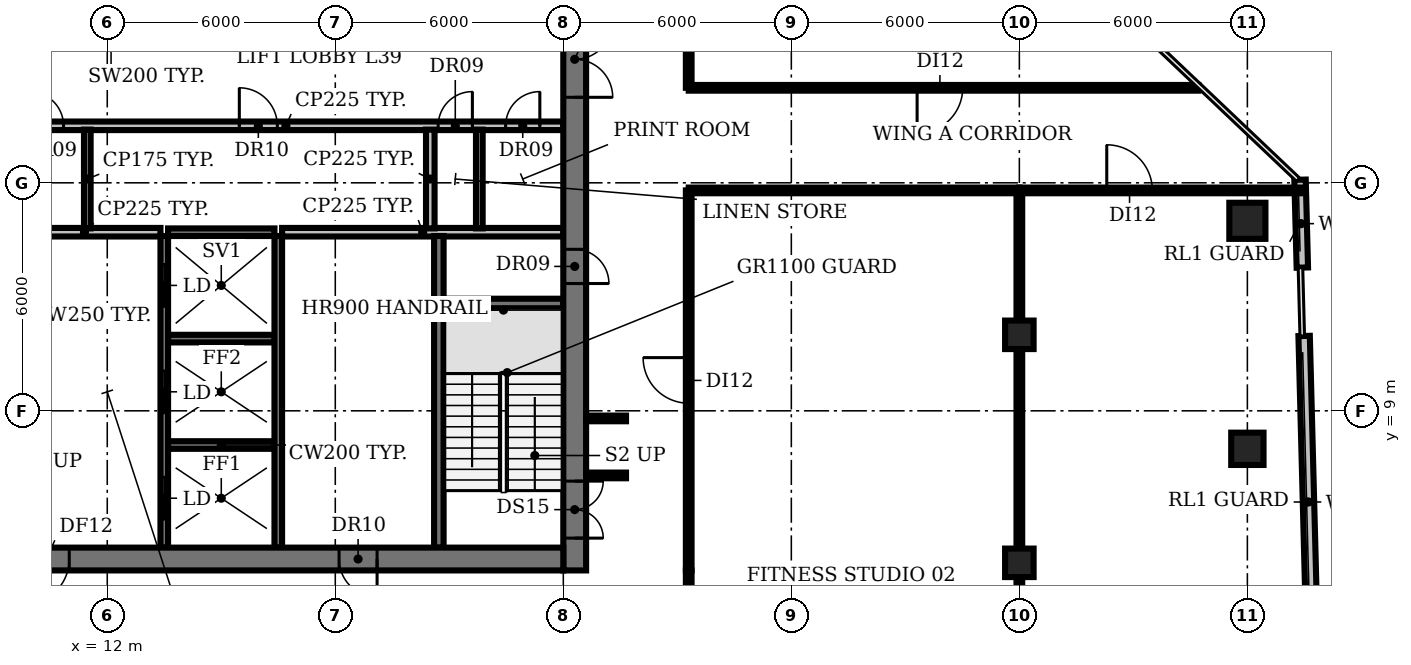
"""IFC4 building model, lengths in metres.
Left out: names, types, materials, properties, quantities, classifications, styles, units other than length and angle.
Written with IfcOpenShell. Run it as: python <this file> out.ifc"""

import sys

from ifc_helpers import new_model, si_unit, direction, frame, frame_2d, origin, origin_2d, place, context, subcontext, project, spatial, rectangle, circle, extrude, element, fill, save


model = new_model("IFC4")
c1 = context("Model", 3, precision=1e-05, world=origin(), true_north=direction((0.0, 1.0)))
c2 = subcontext(c1, "Body", "Model", "MODEL_VIEW")
j1 = project(units=[si_unit("LENGTHUNIT", "METRE"), si_unit("PLANEANGLEUNIT", "RADIAN")], contexts=[c1])
p1 = place(None, origin())
s1 = spatial("IfcSite", under=j1, at=p1, CompositionType="ELEMENT")
p2 = place(p1, origin())
s2 = spatial("IfcBuilding", under=s1, at=p2, CompositionType="ELEMENT")
p3 = place(p2, frame((0.0, 0.0, 176.0)))
s3 = spatial("IfcBuildingStorey", under=s2, at=p3, CompositionType="ELEMENT", Elevation=176.0)
for number, where, z_axis, x_axis in (
    (1, (36.0, 5.0, 0.0), (0.0, 0.0, 1.0), (1.0, 0.0, 0.0)),
    (2, (36.0, 11.0, 0.0), (0.0, 0.0, 1.0), (1.0, 0.0, 0.0)),
):
    element("IfcColumn", number, at=place(p3, frame(where, z_axis=z_axis, x_axis=x_axis)), inside=s3, PredefinedType="COLUMN", context=c2, shape_type="SweptSolid", body=[
        extrude(rectangle(XDim=0.75, YDim=0.75, at=origin_2d()), origin(), (0.0, 0.0, 1.0), 3.85),
    ])
p4 = place(p3, frame((42.0, 8.0, 0.0), z_axis=(0.0, 0.0, 1.0), x_axis=(1.0, 0.0, 0.0)))
e3 = element("IfcColumn", 3, at=p4, inside=s3, PredefinedType="COLUMN", context=c2, shape_type="SweptSolid", body=[
    extrude(rectangle(XDim=0.85, YDim=0.85, at=origin_2d()), origin(), (0.0, 0.0, 1.0), 3.85),
])
p5 = place(p3, frame((42.0, 14.0, 0.0), z_axis=(0.0, 0.0, 1.0), x_axis=(1.0, 0.0, 0.0)))
e4 = element("IfcColumn", 4, at=p5, inside=s3, PredefinedType="COLUMN", context=c2, shape_type="SweptSolid", body=[
    extrude(circle(Radius=0.475, at=origin_2d()), origin(), (0.0, 0.0, 1.0), 3.85),
])
p6 = place(p3, frame((43.722, 2.233, 0.0), z_axis=(0.0, 0.0, 1.0), x_axis=(-0.026202368137, 0.99965665901, 0.0)))
e5 = element("IfcWall", 5, at=p6, inside=s3, PredefinedType="SOLIDWALL", context=c2, shape_type="SweptSolid", body=[
    extrude(rectangle(XDim=8.74, YDim=0.3, at=frame_2d((4.37, 0.0))), origin(), (0.0, 0.0, 1.0), 3.85),
])
p7 = place(p3, frame((43.446, 12.769, 0.0), z_axis=(0.0, 0.0, 1.0), x_axis=(-0.026065246512, 0.999660243745, 0.0)))
e6 = element("IfcWall", 6, at=p7, inside=s3, PredefinedType="SOLIDWALL", context=c2, shape_type="SweptSolid", body=[
    extrude(rectangle(XDim=2.313, YDim=0.3, at=frame_2d((1.157, 0.0))), origin(), (0.0, 0.0, 1.0), 3.85),
])
for number, where, z_axis, x_axis in (
    (7, (13.6, 8.1, 0.0), (0.0, 0.0, 1.0), (1.0, 0.0, 0.0)),
    (8, (13.6, 10.9, 0.0), (0.0, 0.0, 1.0), (1.0, 0.0, 0.0)),
):
    element("IfcWall", number, at=place(p3, frame(where, z_axis=z_axis, x_axis=x_axis)), inside=s3, PredefinedType="SHEAR", context=c2, shape_type="SweptSolid", body=[
        extrude(rectangle(XDim=2.8, YDim=0.2, at=frame_2d((1.4, 0.0))), origin(), (0.0, 0.0, 1.0), 3.85),
    ])
p8 = place(p3, frame((20.85, 11.825, 0.0), z_axis=(0.0, 0.0, 1.0), x_axis=(1.0, 0.0, 0.0)))
e9 = element("IfcWall", 9, at=p8, inside=s3, PredefinedType="SHEAR", context=c2, shape_type="SweptSolid", body=[
    extrude(rectangle(XDim=3.15, YDim=0.25, at=frame_2d((1.575, 0.0))), origin(), (0.0, 0.0, 1.0), 3.85),
])
p9 = place(p3, frame((9.4, 13.7, 0.0), z_axis=(0.0, 0.0, 1.0), x_axis=(1.0, 0.0, 0.0)))
e10 = element("IfcWall", 10, at=p9, inside=s3, PredefinedType="PARTITIONING", context=c2, shape_type="SweptSolid", body=[
    extrude(rectangle(XDim=4.0, YDim=0.225, at=frame_2d((2.0, 0.0))), origin(), (0.0, 0.0, 1.0), 3.85),
])
p10 = place(p3, frame((13.6, 13.7, 0.0), z_axis=(0.0, 0.0, 1.0), x_axis=(1.0, 0.0, 0.0)))
e11 = element("IfcWall", 11, at=p10, inside=s3, PredefinedType="SHEAR", context=c2, shape_type="SweptSolid", body=[
    extrude(rectangle(XDim=2.8, YDim=0.2, at=frame_2d((1.4, 0.0))), origin(), (0.0, 0.0, 1.0), 3.85),
])
p11 = place(p3, frame((16.6, 13.7, 0.0), z_axis=(0.0, 0.0, 1.0), x_axis=(1.0, 0.0, 0.0)))
e12 = element("IfcWall", 12, at=p11, inside=s3, PredefinedType="PARTITIONING", context=c2, shape_type="SweptSolid", body=[
    extrude(rectangle(XDim=7.4, YDim=0.225, at=frame_2d((3.7, 0.0))), origin(), (0.0, 0.0, 1.0), 3.85),
])
p12 = place(p3, frame((9.4, 16.5, 0.0), z_axis=(0.0, 0.0, 1.0), x_axis=(1.0, 0.0, 0.0)))
e13 = element("IfcWall", 13, at=p12, inside=s3, PredefinedType="PARTITIONING", context=c2, shape_type="SweptSolid", body=[
    extrude(rectangle(XDim=14.6, YDim=0.225, at=frame_2d((7.3, 0.0))), origin(), (0.0, 0.0, 1.0), 3.85),
])
p13 = place(p12, frame((0.55, 0.0, 0.0)))
e14 = element("IfcOpeningElement", 14, at=p13, cuts=e13, PredefinedType="OPENING", context=c2, shape_type="SweptSolid", body=[
    extrude(rectangle(XDim=0.9, YDim=2.1, at=frame_2d((0.45, 1.05))), frame((0.0, 0.123, 0.0), z_axis=(0.0, -1.0, 0.0), x_axis=(1.0, 0.0, 0.0)), (0.0, 0.0, 1.0), 0.245),
])
p14 = place(p12, frame((6.075, 0.0, 0.0)))
e15 = element("IfcOpeningElement", 15, at=p14, cuts=e13, PredefinedType="OPENING", context=c2, shape_type="SweptSolid", body=[
    extrude(rectangle(XDim=1.0, YDim=2.1, at=frame_2d((0.5, 1.05))), frame((0.0, 0.123, 0.0), z_axis=(0.0, -1.0, 0.0), x_axis=(1.0, 0.0, 0.0)), (0.0, 0.0, 1.0), 0.245),
])
p15 = place(p12, frame((11.308, 0.0, 0.0)))
e16 = element("IfcOpeningElement", 16, at=p15, cuts=e13, PredefinedType="OPENING", context=c2, shape_type="SweptSolid", body=[
    extrude(rectangle(XDim=0.9, YDim=2.1, at=frame_2d((0.45, 1.05))), frame((0.0, 0.123, 0.0), z_axis=(0.0, -1.0, 0.0), x_axis=(1.0, 0.0, 0.0)), (0.0, 0.0, 1.0), 0.245),
])
p16 = place(p12, frame((13.083, 0.0, 0.0)))
e17 = element("IfcOpeningElement", 17, at=p16, cuts=e13, PredefinedType="OPENING", context=c2, shape_type="SweptSolid", body=[
    extrude(rectangle(XDim=0.9, YDim=2.1, at=frame_2d((0.45, 1.05))), frame((0.0, 0.123, 0.0), z_axis=(0.0, -1.0, 0.0), x_axis=(1.0, 0.0, 0.0)), (0.0, 0.0, 1.0), 0.245),
])
p17 = place(p3, frame((11.475, 13.8, 0.0), z_axis=(0.0, 0.0, 1.0), x_axis=(0.0, 1.0, 0.0)))
e18 = element("IfcWall", 18, at=p17, inside=s3, PredefinedType="PARTITIONING", context=c2, shape_type="SweptSolid", body=[
    extrude(rectangle(XDim=2.6, YDim=0.175, at=frame_2d((1.3, 0.0))), origin(), (0.0, 0.0, 1.0), 3.85),
])
p18 = place(p3, frame((13.5, 5.4, 0.0), z_axis=(0.0, 0.0, 1.0), x_axis=(0.0, 1.0, 0.0)))
e19 = element("IfcWall", 19, at=p18, inside=s3, PredefinedType="SHEAR", context=c2, shape_type="SweptSolid", body=[
    extrude(rectangle(XDim=8.2, YDim=0.2, at=frame_2d((4.1, 0.0))), origin(), (0.0, 0.0, 1.0), 3.85),
])
p19 = place(p18, frame((0.75, 0.0, 0.0)))
e20 = element("IfcOpeningElement", 20, at=p19, cuts=e19, PredefinedType="OPENING", context=c2, shape_type="SweptSolid", body=[
    extrude(rectangle(XDim=1.1, YDim=2.1, at=frame_2d((0.55, 1.05))), frame((0.0, 0.11, 0.0), z_axis=(0.0, -1.0, 0.0), x_axis=(1.0, 0.0, 0.0)), (0.0, 0.0, 1.0), 0.22),
])
p20 = place(p18, frame((3.55, 0.0, 0.0)))
e21 = element("IfcOpeningElement", 21, at=p20, cuts=e19, PredefinedType="OPENING", context=c2, shape_type="SweptSolid", body=[
    extrude(rectangle(XDim=1.1, YDim=2.1, at=frame_2d((0.55, 1.05))), frame((0.0, 0.11, 0.0), z_axis=(0.0, -1.0, 0.0), x_axis=(1.0, 0.0, 0.0)), (0.0, 0.0, 1.0), 0.22),
])
p21 = place(p18, frame((6.35, 0.0, 0.0)))
e22 = element("IfcOpeningElement", 22, at=p21, cuts=e19, PredefinedType="OPENING", context=c2, shape_type="SweptSolid", body=[
    extrude(rectangle(XDim=1.1, YDim=2.1, at=frame_2d((0.55, 1.05))), frame((0.0, 0.11, 0.0), z_axis=(0.0, -1.0, 0.0), x_axis=(1.0, 0.0, 0.0)), (0.0, 0.0, 1.0), 0.22),
])
p22 = place(p3, frame((16.5, 5.4, 0.0), z_axis=(0.0, 0.0, 1.0), x_axis=(0.0, 1.0, 0.0)))
e23 = element("IfcWall", 23, at=p22, inside=s3, PredefinedType="SHEAR", context=c2, shape_type="SweptSolid", body=[
    extrude(rectangle(XDim=8.2, YDim=0.2, at=frame_2d((4.1, 0.0))), origin(), (0.0, 0.0, 1.0), 3.85),
])
p23 = place(p3, frame((20.5, 13.8, 0.0), z_axis=(0.0, 0.0, 1.0), x_axis=(0.0, 1.0, 0.0)))
e24 = element("IfcWall", 24, at=p23, inside=s3, PredefinedType="PARTITIONING", context=c2, shape_type="SweptSolid", body=[
    extrude(rectangle(XDim=2.6, YDim=0.225, at=frame_2d((1.3, 0.0))), origin(), (0.0, 0.0, 1.0), 3.85),
])
p24 = place(p3, frame((20.725, 5.4, 0.0), z_axis=(0.0, 0.0, 1.0), x_axis=(0.0, 1.0, 0.0)))
e25 = element("IfcWall", 25, at=p24, inside=s3, PredefinedType="SHEAR", context=c2, shape_type="SweptSolid", body=[
    extrude(rectangle(XDim=8.2, YDim=0.25, at=frame_2d((4.1, 0.0))), origin(), (0.0, 0.0, 1.0), 3.85),
])
p25 = place(p3, frame((21.79, 13.8, 0.0), z_axis=(0.0, 0.0, 1.0), x_axis=(0.0, 1.0, 0.0)))
e26 = element("IfcWall", 26, at=p25, inside=s3, PredefinedType="PARTITIONING", context=c2, shape_type="SweptSolid", body=[
    extrude(rectangle(XDim=2.6, YDim=0.175, at=frame_2d((1.3, 0.0))), origin(), (0.0, 0.0, 1.0), 3.85),
])
p26 = place(p3, frame((24.3, 25.555, 0.0), z_axis=(0.0, 0.0, 1.0), x_axis=(0.0, -1.0, 0.0)))
e27 = element("IfcWall", 27, at=p26, inside=s3, PredefinedType="SHEAR", context=c2, shape_type="SweptSolid", body=[
    extrude(rectangle(XDim=20.755, YDim=0.6, at=frame_2d((10.377, 0.0))), origin(), (0.0, 0.0, 1.0), 3.85),
])
p27 = place(p26, frame((18.405, 0.0, 0.0)))
e28 = element("IfcOpeningElement", 28, at=p27, cuts=e27, PredefinedType="OPENING", context=c2, shape_type="SweptSolid", body=[
    extrude(rectangle(XDim=1.5, YDim=2.1, at=frame_2d((0.75, 1.05))), frame((0.0, 0.31, 0.0), z_axis=(0.0, -1.0, 0.0), x_axis=(1.0, 0.0, 0.0)), (0.0, 0.0, 1.0), 0.62),
])
p28 = place(p26, frame((12.305, 0.0, 0.0)))
e29 = element("IfcOpeningElement", 29, at=p28, cuts=e27, PredefinedType="OPENING", context=c2, shape_type="SweptSolid", body=[
    extrude(rectangle(XDim=0.9, YDim=2.1, at=frame_2d((0.45, 1.05))), frame((0.0, 0.31, 0.0), z_axis=(0.0, -1.0, 0.0), x_axis=(1.0, 0.0, 0.0)), (0.0, 0.0, 1.0), 0.62),
])
p29 = place(p26, frame((6.305, 0.0, 0.0)))
e30 = element("IfcOpeningElement", 30, at=p29, cuts=e27, PredefinedType="OPENING", context=c2, shape_type="SweptSolid", body=[
    extrude(rectangle(XDim=2.0, YDim=2.1, at=frame_2d((1.0, 1.05))), frame((0.0, 0.31, 0.0), z_axis=(0.0, -1.0, 0.0), x_axis=(1.0, 0.0, 0.0)), (0.0, 0.0, 1.0), 0.62),
])
p30 = place(p3, frame((24.0, 5.1, 0.0), z_axis=(0.0, 0.0, 1.0), x_axis=(-1.0, 0.0, 0.0)))
e31 = element("IfcWall", 31, at=p30, inside=s3, PredefinedType="SHEAR", context=c2, shape_type="SweptSolid", body=[
    extrude(rectangle(XDim=18.0, YDim=0.6, at=frame_2d((9.0, 0.0))), origin(), (0.0, 0.0, 1.0), 3.85),
])
p31 = place(p30, frame((13.0, 0.0, 0.0)))
e32 = element("IfcOpeningElement", 32, at=p31, cuts=e31, PredefinedType="OPENING", context=c2, shape_type="SweptSolid", body=[
    extrude(rectangle(XDim=1.2, YDim=2.1, at=frame_2d((0.6, 1.05))), frame((0.0, 0.31, 0.0), z_axis=(0.0, -1.0, 0.0), x_axis=(1.0, 0.0, 0.0)), (0.0, 0.0, 1.0), 0.62),
])
p32 = place(p30, frame((4.9, 0.0, 0.0)))
e33 = element("IfcOpeningElement", 33, at=p32, cuts=e31, PredefinedType="OPENING", context=c2, shape_type="SweptSolid", body=[
    extrude(rectangle(XDim=1.0, YDim=2.1, at=frame_2d((0.5, 1.05))), frame((0.0, 0.31, 0.0), z_axis=(0.0, -1.0, 0.0), x_axis=(1.0, 0.0, 0.0)), (0.0, 0.0, 1.0), 0.62),
])
for number, where, z_axis, x_axis in (
    (34, (24.6, 7.3, 0.0), (0.0, 0.0, 1.0), (1.0, 0.0, 0.0)),
    (35, (24.6, 8.8, 0.0), (0.0, 0.0, 1.0), (1.0, 0.0, 0.0)),
):
    element("IfcWall", number, at=place(p3, frame(where, z_axis=z_axis, x_axis=x_axis)), inside=s3, PredefinedType="PARTITIONING", context=c2, shape_type="SweptSolid", body=[
        extrude(rectangle(XDim=1.05, YDim=0.15, at=frame_2d((0.525, 0.0))), origin(), (0.0, 0.0, 1.0), 2.88),
    ])
p33 = place(p3, frame((27.3, 0.9, 0.0), z_axis=(0.0, 0.0, 1.0), x_axis=(0.0, 1.0, 0.0)))
e36 = element("IfcWall", 36, at=p33, inside=s3, PredefinedType="PARTITIONING", context=c2, shape_type="SweptSolid", body=[
    extrude(rectangle(XDim=3.9, YDim=0.15, at=frame_2d((1.95, 0.0))), origin(), (0.0, 0.0, 1.0), 2.88),
])
p34 = place(p3, frame((27.3, 4.8, 0.0), z_axis=(0.0, 0.0, 1.0), x_axis=(0.0, 1.0, 0.0)))
e37 = element("IfcWall", 37, at=p34, inside=s3, PredefinedType="PARTITIONING", context=c2, shape_type="SweptSolid", body=[
    extrude(rectangle(XDim=10.0, YDim=0.15, at=frame_2d((5.0, 0.0))), origin(), (0.0, 0.0, 1.0), 2.88),
])
p35 = place(p34, frame((4.4, 0.0, 0.0)))
e38 = element("IfcOpeningElement", 38, at=p35, cuts=e37, PredefinedType="OPENING", context=c2, shape_type="SweptSolid", body=[
    extrude(rectangle(XDim=1.2, YDim=2.1, at=frame_2d((0.6, 1.05))), frame((0.0, 0.085, 0.0), z_axis=(0.0, -1.0, 0.0), x_axis=(1.0, 0.0, 0.0)), (0.0, 0.0, 1.0), 0.17),
])
p36 = place(p3, frame((27.3, 14.8, 0.0), z_axis=(0.0, 0.0, 1.0), x_axis=(1.0, 0.0, 0.0)))
e39 = element("IfcWall", 39, at=p36, inside=s3, PredefinedType="PARTITIONING", context=c2, shape_type="SweptSolid", body=[
    extrude(rectangle(XDim=8.7, YDim=0.15, at=frame_2d((4.35, 0.0))), origin(), (0.0, 0.0, 1.0), 2.88),
])
p37 = place(p3, frame((27.3, 17.5, 0.0), z_axis=(0.0, 0.0, 1.0), x_axis=(0.0, 1.0, 0.0)))
e40 = element("IfcWall", 40, at=p37, inside=s3, PredefinedType="PARTITIONING", context=c2, shape_type="SweptSolid", body=[
    extrude(rectangle(XDim=6.88, YDim=0.15, at=frame_2d((3.44, 0.0))), origin(), (0.0, 0.0, 1.0), 2.88),
])
p38 = place(p3, frame((36.0, -4.98, 0.0), z_axis=(0.0, 0.0, 1.0), x_axis=(0.0, 1.0, 0.0)))
e41 = element("IfcWall", 41, at=p38, inside=s3, PredefinedType="PARTITIONING", context=c2, shape_type="SweptSolid", body=[
    extrude(rectangle(XDim=19.78, YDim=0.15, at=frame_2d((9.89, 0.0))), origin(), (0.0, 0.0, 1.0), 2.88),
])
p39 = place(p3, frame((36.0, 14.8, 0.0), z_axis=(0.0, 0.0, 1.0), x_axis=(1.0, 0.0, 0.0)))
e42 = element("IfcWall", 42, at=p39, inside=s3, PredefinedType="PARTITIONING", context=c2, shape_type="SweptSolid", body=[
    extrude(rectangle(XDim=7.404, YDim=0.15, at=frame_2d((3.702, 0.0))), origin(), (0.0, 0.0, 1.0), 2.88),
])
p40 = place(p39, frame((2.3, 0.0, 0.0)))
e43 = element("IfcOpeningElement", 43, at=p40, cuts=e42, PredefinedType="OPENING", context=c2, shape_type="SweptSolid", body=[
    extrude(rectangle(XDim=1.2, YDim=2.1, at=frame_2d((0.6, 1.05))), frame((0.0, 0.085, 0.0), z_axis=(0.0, -1.0, 0.0), x_axis=(1.0, 0.0, 0.0)), (0.0, 0.0, 1.0), 0.17),
])
p41 = place(p3, frame((40.71, 17.5, 0.0), z_axis=(0.0, 0.0, 1.0), x_axis=(-1.0, 0.0, 0.0)))
e44 = element("IfcWall", 44, at=p41, inside=s3, PredefinedType="PARTITIONING", context=c2, shape_type="SweptSolid", body=[
    extrude(rectangle(XDim=13.41, YDim=0.15, at=frame_2d((6.705, 0.0))), origin(), (0.0, 0.0, 1.0), 2.88),
])
p42 = place(p41, frame((6.2, 0.0, 0.0)))
e45 = element("IfcOpeningElement", 45, at=p42, cuts=e44, PredefinedType="OPENING", context=c2, shape_type="SweptSolid", body=[
    extrude(rectangle(XDim=1.2, YDim=2.1, at=frame_2d((0.6, 1.05))), frame((0.0, 0.085, 0.0), z_axis=(0.0, -1.0, 0.0), x_axis=(1.0, 0.0, 0.0)), (0.0, 0.0, 1.0), 0.17),
])
p43 = place(p13, origin())
e46 = element("IfcDoor", 46, at=p43, inside=s3, OperationType="SINGLE_SWING_LEFT", PredefinedType="DOOR", context=c2, shape_type="SweptSolid", body=[
    extrude(rectangle(XDim=0.9, YDim=2.1, at=frame_2d((0.45, 1.05))), frame((0.0, 0.025, 0.0), z_axis=(0.0, -1.0, 0.0), x_axis=(1.0, 0.0, 0.0)), (0.0, 0.0, 1.0), 0.05),
])
fill(e14, e46)
p44 = place(p14, origin())
e47 = element("IfcDoor", 47, at=p44, inside=s3, OperationType="SINGLE_SWING_LEFT", PredefinedType="DOOR", context=c2, shape_type="SweptSolid", body=[
    extrude(rectangle(XDim=1.0, YDim=2.1, at=frame_2d((0.5, 1.05))), frame((0.0, 0.025, 0.0), z_axis=(0.0, -1.0, 0.0), x_axis=(1.0, 0.0, 0.0)), (0.0, 0.0, 1.0), 0.05),
])
fill(e15, e47)
p45 = place(p15, origin())
e48 = element("IfcDoor", 48, at=p45, inside=s3, OperationType="SINGLE_SWING_RIGHT", PredefinedType="DOOR", context=c2, shape_type="SweptSolid", body=[
    extrude(rectangle(XDim=0.9, YDim=2.1, at=frame_2d((0.45, 1.05))), frame((0.0, 0.025, 0.0), z_axis=(0.0, -1.0, 0.0), x_axis=(1.0, 0.0, 0.0)), (0.0, 0.0, 1.0), 0.05),
])
fill(e16, e48)
p46 = place(p16, origin())
e49 = element("IfcDoor", 49, at=p46, inside=s3, OperationType="SINGLE_SWING_RIGHT", PredefinedType="DOOR", context=c2, shape_type="SweptSolid", body=[
    extrude(rectangle(XDim=0.9, YDim=2.1, at=frame_2d((0.45, 1.05))), frame((0.0, 0.025, 0.0), z_axis=(0.0, -1.0, 0.0), x_axis=(1.0, 0.0, 0.0)), (0.0, 0.0, 1.0), 0.05),
])
fill(e17, e49)
p47 = place(p19, origin())
e50 = element("IfcDoor", 50, at=p47, inside=s3, OperationType="DOUBLE_DOOR_SLIDING", PredefinedType="DOOR", context=c2, shape_type="SweptSolid", body=[
    extrude(rectangle(XDim=1.1, YDim=2.1, at=frame_2d((0.55, 1.05))), frame((0.0, 0.025, 0.0), z_axis=(0.0, -1.0, 0.0), x_axis=(1.0, 0.0, 0.0)), (0.0, 0.0, 1.0), 0.05),
])
fill(e20, e50)
p48 = place(p20, origin())
e51 = element("IfcDoor", 51, at=p48, inside=s3, OperationType="DOUBLE_DOOR_SLIDING", PredefinedType="DOOR", context=c2, shape_type="SweptSolid", body=[
    extrude(rectangle(XDim=1.1, YDim=2.1, at=frame_2d((0.55, 1.05))), frame((0.0, 0.025, 0.0), z_axis=(0.0, -1.0, 0.0), x_axis=(1.0, 0.0, 0.0)), (0.0, 0.0, 1.0), 0.05),
])
fill(e21, e51)
p49 = place(p21, origin())
e52 = element("IfcDoor", 52, at=p49, inside=s3, OperationType="DOUBLE_DOOR_SLIDING", PredefinedType="DOOR", context=c2, shape_type="SweptSolid", body=[
    extrude(rectangle(XDim=1.1, YDim=2.1, at=frame_2d((0.55, 1.05))), frame((0.0, 0.025, 0.0), z_axis=(0.0, -1.0, 0.0), x_axis=(1.0, 0.0, 0.0)), (0.0, 0.0, 1.0), 0.05),
])
fill(e22, e52)
p50 = place(p27, origin())
e53 = element("IfcDoor", 53, at=p50, inside=s3, OperationType="DOUBLE_DOOR_SINGLE_SWING", PredefinedType="DOOR", context=c2, shape_type="SweptSolid", body=[
    extrude(rectangle(XDim=1.5, YDim=2.1, at=frame_2d((0.75, 1.05))), frame((0.0, 0.025, 0.0), z_axis=(0.0, -1.0, 0.0), x_axis=(1.0, 0.0, 0.0)), (0.0, 0.0, 1.0), 0.05),
])
fill(e28, e53)
p51 = place(p28, origin())
e54 = element("IfcDoor", 54, at=p51, inside=s3, OperationType="SINGLE_SWING_RIGHT", PredefinedType="DOOR", context=c2, shape_type="SweptSolid", body=[
    extrude(rectangle(XDim=0.9, YDim=2.1, at=frame_2d((0.45, 1.05))), frame((0.0, -0.24, 0.0), z_axis=(0.0, -1.0, 0.0), x_axis=(1.0, 0.0, 0.0)), (0.0, 0.0, 1.0), 0.05),
])
fill(e29, e54)
p52 = place(p29, origin())
e55 = element("IfcDoor", 55, at=p52, inside=s3, OperationType="DOUBLE_DOOR_SINGLE_SWING", PredefinedType="DOOR", context=c2, shape_type="SweptSolid", body=[
    extrude(rectangle(XDim=2.0, YDim=2.1, at=frame_2d((1.0, 1.05))), frame((0.0, 0.025, 0.0), z_axis=(0.0, -1.0, 0.0), x_axis=(1.0, 0.0, 0.0)), (0.0, 0.0, 1.0), 0.05),
])
fill(e30, e55)
p53 = place(p31, origin())
e56 = element("IfcDoor", 56, at=p53, inside=s3, OperationType="SINGLE_SWING_RIGHT", PredefinedType="DOOR", context=c2, shape_type="SweptSolid", body=[
    extrude(rectangle(XDim=1.2, YDim=2.1, at=frame_2d((0.6, 1.05))), frame((0.0, 0.025, 0.0), z_axis=(0.0, -1.0, 0.0), x_axis=(1.0, 0.0, 0.0)), (0.0, 0.0, 1.0), 0.05),
])
fill(e32, e56)
p54 = place(p32, origin())
e57 = element("IfcDoor", 57, at=p54, inside=s3, OperationType="SINGLE_SWING_LEFT", PredefinedType="DOOR", context=c2, shape_type="SweptSolid", body=[
    extrude(rectangle(XDim=1.0, YDim=2.1, at=frame_2d((0.5, 1.05))), frame((0.0, -0.24, 0.0), z_axis=(0.0, -1.0, 0.0), x_axis=(1.0, 0.0, 0.0)), (0.0, 0.0, 1.0), 0.05),
])
fill(e33, e57)
p55 = place(p35, origin())
e58 = element("IfcDoor", 58, at=p55, inside=s3, OperationType="SINGLE_SWING_RIGHT", PredefinedType="DOOR", context=c2, shape_type="SweptSolid", body=[
    extrude(rectangle(XDim=1.2, YDim=2.1, at=frame_2d((0.6, 1.05))), frame((0.0, 0.025, 0.0), z_axis=(0.0, -1.0, 0.0), x_axis=(1.0, 0.0, 0.0)), (0.0, 0.0, 1.0), 0.05),
])
fill(e38, e58)
p56 = place(p40, origin())
e59 = element("IfcDoor", 59, at=p56, inside=s3, OperationType="SINGLE_SWING_LEFT", PredefinedType="DOOR", context=c2, shape_type="SweptSolid", body=[
    extrude(rectangle(XDim=1.2, YDim=2.1, at=frame_2d((0.6, 1.05))), frame((0.0, 0.025, 0.0), z_axis=(0.0, -1.0, 0.0), x_axis=(1.0, 0.0, 0.0)), (0.0, 0.0, 1.0), 0.05),
])
fill(e43, e59)
p57 = place(p42, origin())
e60 = element("IfcDoor", 60, at=p57, inside=s3, OperationType="SINGLE_SWING_RIGHT", PredefinedType="DOOR", context=c2, shape_type="SweptSolid", body=[
    extrude(rectangle(XDim=1.2, YDim=2.1, at=frame_2d((0.6, 1.05))), frame((0.0, 0.025, 0.0), z_axis=(0.0, -1.0, 0.0), x_axis=(1.0, 0.0, 0.0)), (0.0, 0.0, 1.0), 0.05),
])
fill(e45, e60)
save(model, sys.argv[1])
